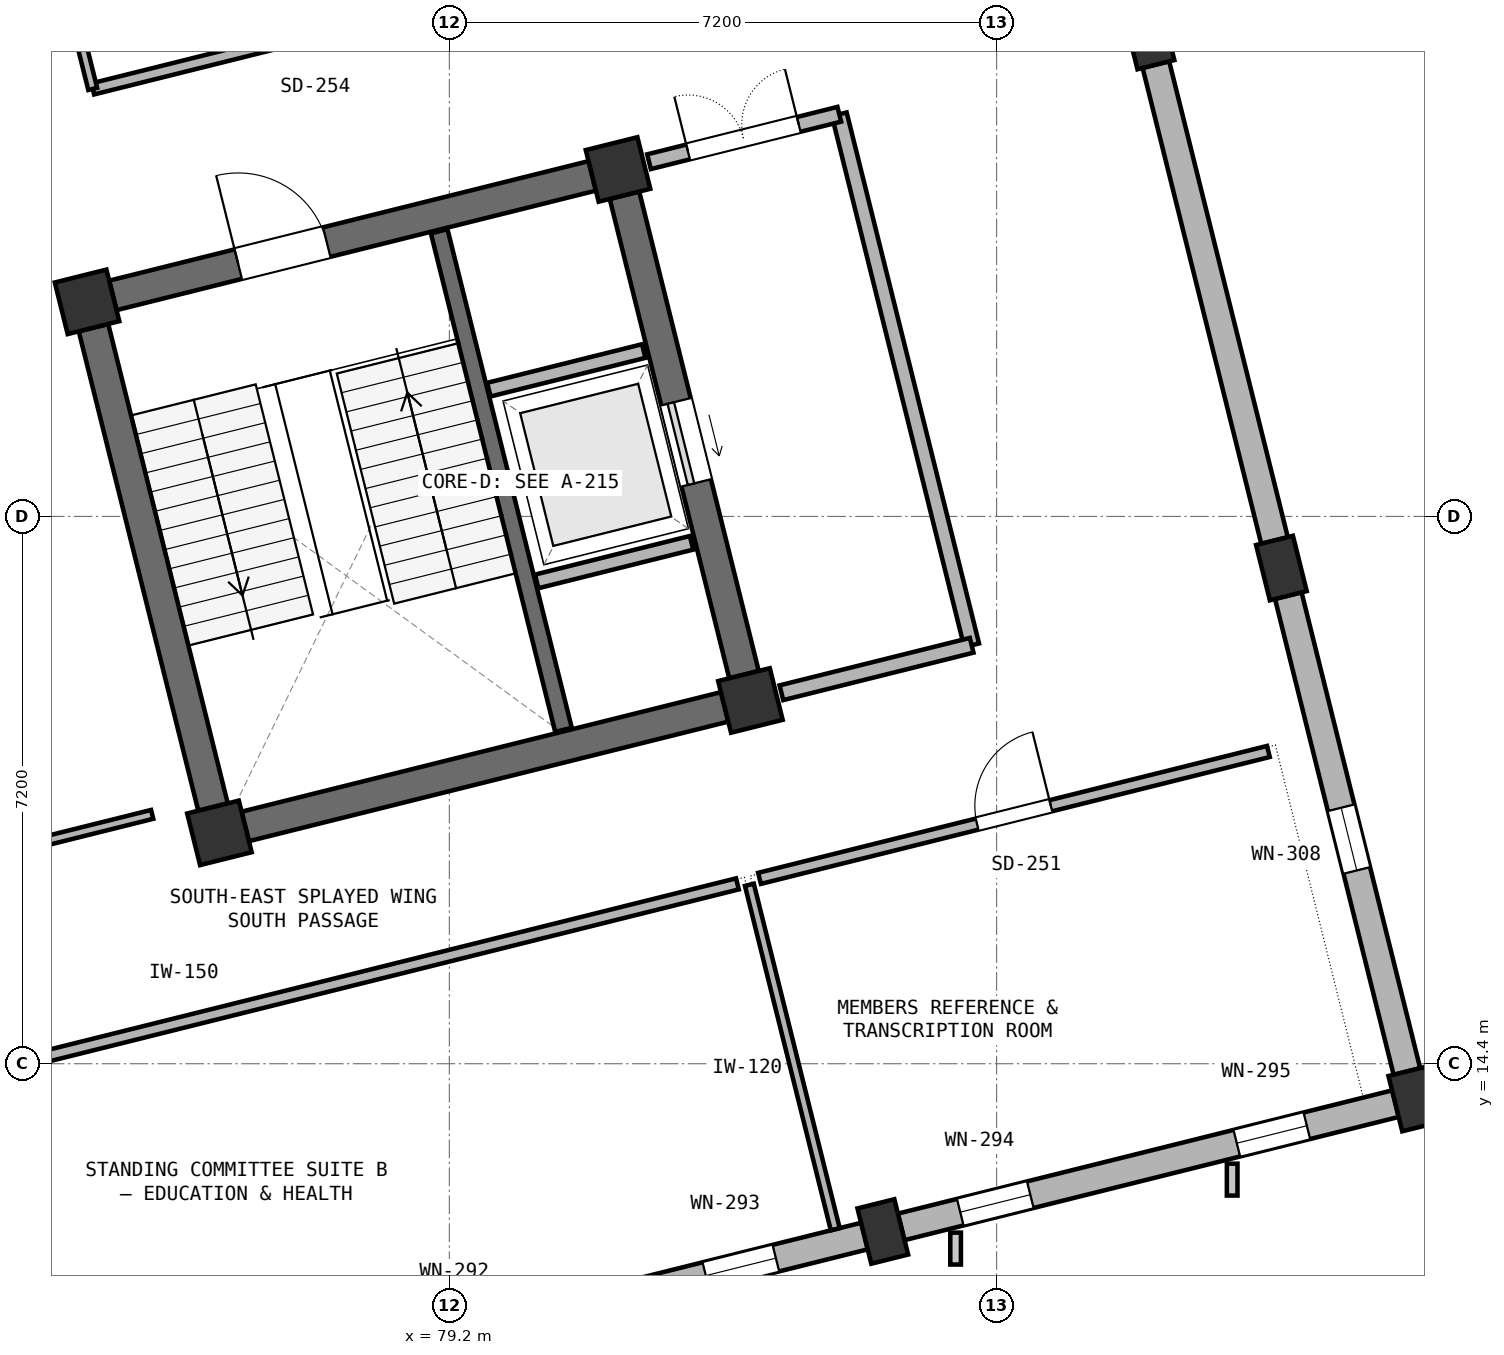
"""IFC4 building model, lengths in metres.
Left out: names, types, materials, properties, quantities, classifications, styles, units other than length and angle.
Written with IfcOpenShell. Run it as: python <this file> out.ifc"""

import sys

from ifc_helpers import new_model, si_unit, direction, frame, frame_2d, origin, origin_2d, place, context, subcontext, project, spatial, rectangle, extrude, element, fill, save


model = new_model("IFC4")
c1 = context("Model", 3, precision=1e-05, world=origin(), true_north=direction((0.0, 1.0)))
c2 = subcontext(c1, "Body", "Model", "MODEL_VIEW")
j1 = project(units=[si_unit("LENGTHUNIT", "METRE"), si_unit("PLANEANGLEUNIT", "RADIAN")], contexts=[c1])
p1 = place(None, origin())
s1 = spatial("IfcSite", under=j1, at=p1, CompositionType="ELEMENT")
p2 = place(p1, origin())
s2 = spatial("IfcBuilding", under=s1, at=p2, CompositionType="ELEMENT")
p3 = place(p2, frame((0.0, 0.0, 10.2)))
s3 = spatial("IfcBuildingStorey", under=s2, at=p3, CompositionType="ELEMENT", Elevation=10.2)
for number, where, z_axis, x_axis in (
    (1, (76.175, 17.437, 0.0), (0.0, 0.0, 1.0), (0.97, 0.242, 0.0)),
    (2, (74.433, 24.423, 0.0), (0.0, 0.0, 1.0), (0.97, 0.242, 0.0)),
):
    element("IfcColumn", number, at=place(p3, frame(where, z_axis=z_axis, x_axis=x_axis)), inside=s3, PredefinedType="COLUMN", context=c2, shape_type="SweptSolid", body=[
        extrude(rectangle(XDim=0.7, YDim=0.7, at=origin_2d()), origin(), (0.0, 0.0, 1.0), 4.2),
    ])
p4 = place(p3, frame((84.903, 12.193, 0.0), z_axis=(0.0, 0.0, 1.0), x_axis=(0.970295726276, 0.2419218956, 0.0)))
e3 = element("IfcColumn", 3, at=p4, inside=s3, PredefinedType="COLUMN", context=c2, shape_type="SweptSolid", body=[
    extrude(rectangle(XDim=0.5, YDim=0.75, at=origin_2d()), origin(), (0.0, 0.0, 1.0), 4.2),
])
for number, where, z_axis, x_axis in (
    (4, (83.161, 19.179, 0.0), (0.0, 0.0, 1.0), (0.97, 0.242, 0.0)),
    (5, (81.419, 26.165, 0.0), (0.0, 0.0, 1.0), (0.97, 0.242, 0.0)),
):
    element("IfcColumn", number, at=place(p3, frame(where, z_axis=z_axis, x_axis=x_axis)), inside=s3, PredefinedType="COLUMN", context=c2, shape_type="SweptSolid", body=[
        extrude(rectangle(XDim=0.7, YDim=0.7, at=origin_2d()), origin(), (0.0, 0.0, 1.0), 4.2),
    ])
for number, where, z_axis, x_axis in (
    (6, (91.889, 13.935, 0.0), (0.0, 0.0, 1.0), (0.97, 0.242, 0.0)),
    (7, (90.147, 20.921, 0.0), (0.0, 0.0, 1.0), (0.97, 0.242, 0.0)),
    (8, (88.405, 27.907, 0.0), (0.0, 0.0, 1.0), (0.97, 0.242, 0.0)),
):
    element("IfcColumn", number, at=place(p3, frame(where, z_axis=z_axis, x_axis=x_axis)), inside=s3, PredefinedType="COLUMN", context=c2, shape_type="SweptSolid", body=[
        extrude(rectangle(XDim=0.5, YDim=0.75, at=origin_2d()), origin(), (0.0, 0.0, 1.0), 4.2),
    ])
p5 = place(p3, frame((76.515, 17.522, 0.0), z_axis=(0.0, 0.0, 1.0), x_axis=(0.970294759049, 0.241925774902, 0.0)))
e9 = element("IfcWall", 9, at=p5, inside=s3, PredefinedType="SHEAR", context=c2, shape_type="SweptSolid", body=[
    extrude(rectangle(XDim=6.5, YDim=0.4, at=frame_2d((3.25, 0.0))), origin(), (0.0, 0.0, 1.0), 4.2),
])
p6 = place(p3, frame((83.076, 19.519, 0.0), z_axis=(0.0, 0.0, 1.0), x_axis=(-0.241925774902, 0.970294759049, 0.0)))
e10 = element("IfcWall", 10, at=p6, inside=s3, PredefinedType="SHEAR", context=c2, shape_type="SweptSolid", body=[
    extrude(rectangle(XDim=6.5, YDim=0.4, at=frame_2d((3.25, 0.0))), origin(), (0.0, 0.0, 1.0), 4.2),
])
p7 = place(p6, frame((2.6, 0.0, 0.0)))
e11 = element("IfcOpeningElement", 11, at=p7, cuts=e10, PredefinedType="OPENING", context=c2, shape_type="SweptSolid", body=[
    extrude(rectangle(XDim=1.1, YDim=2.2, at=frame_2d((0.55, 1.1))), frame((0.0, 0.21, 0.0), z_axis=(0.0, -1.0, 0.0), x_axis=(1.0, 0.0, 0.0)), (0.0, 0.0, 1.0), 0.42),
])
p8 = place(p3, frame((81.08, 26.081, 0.0), z_axis=(0.0, 0.0, 1.0), x_axis=(-0.970294759049, -0.241925774902, 0.0)))
e12 = element("IfcWall", 12, at=p8, inside=s3, PredefinedType="SHEAR", context=c2, shape_type="SweptSolid", body=[
    extrude(rectangle(XDim=6.5, YDim=0.4, at=frame_2d((3.25, 0.0))), origin(), (0.0, 0.0, 1.0), 4.2),
])
p9 = place(p8, frame((3.6, 0.0, 0.0)))
e13 = element("IfcOpeningElement", 13, at=p9, cuts=e12, PredefinedType="OPENING", context=c2, shape_type="SweptSolid", body=[
    extrude(rectangle(XDim=1.2, YDim=2.2, at=frame_2d((0.6, 1.1))), frame((0.0, 0.21, 0.0), z_axis=(0.0, -1.0, 0.0), x_axis=(1.0, 0.0, 0.0)), (0.0, 0.0, 1.0), 0.42),
])
p10 = place(p3, frame((74.518, 24.084, 0.0), z_axis=(0.0, 0.0, 1.0), x_axis=(0.241925774902, -0.970294759049, 0.0)))
e14 = element("IfcWall", 14, at=p10, inside=s3, PredefinedType="SHEAR", context=c2, shape_type="SweptSolid", body=[
    extrude(rectangle(XDim=6.5, YDim=0.4, at=frame_2d((3.25, 0.0))), origin(), (0.0, 0.0, 1.0), 4.2),
])
p11 = place(p3, frame((80.701, 18.792, 0.0), z_axis=(0.0, 0.0, 1.0), x_axis=(-0.241898249226, 0.970301621673, 0.0)))
e15 = element("IfcWall", 15, at=p11, inside=s3, PredefinedType="SHEAR", context=c2, shape_type="SweptSolid", body=[
    extrude(rectangle(XDim=6.76, YDim=0.225, at=frame_2d((3.38, 0.0))), origin(), (0.0, 0.0, 1.0), 4.2),
])
for number, where, z_axis, x_axis in (
    (16, (80.349, 20.745, 0.0), (0.0, 0.0, 1.0), (0.97, 0.242, 0.0)),
    (17, (79.72, 23.268, 0.0), (0.0, 0.0, 1.0), (0.97, 0.242, 0.0)),
):
    element("IfcWall", number, at=place(p3, frame(where, z_axis=z_axis, x_axis=x_axis)), inside=s3, PredefinedType="PARTITIONING", context=c2, shape_type="SweptSolid", body=[
        extrude(rectangle(XDim=2.1, YDim=0.185, at=frame_2d((1.05, 0.0))), origin(), (0.0, 0.0, 1.0), 4.2),
    ])
p12 = place(p3, frame((78.157, 10.511, 0.0), z_axis=(0.0, 0.0, 1.0), x_axis=(0.970296540998, 0.241918627903, 0.0)))
e18 = element("IfcWall", 18, at=p12, inside=s3, PredefinedType="SOLIDWALL", context=c2, shape_type="SweptSolid", body=[
    extrude(rectangle(XDim=6.704, YDim=0.36, at=frame_2d((3.352, 0.0))), origin(), (0.0, 0.0, 1.0), 3.04),
])
p13 = place(p12, frame((0.802, 0.0, 0.7)))
e19 = element("IfcOpeningElement", 19, at=p13, cuts=e18, PredefinedType="OPENING", context=c2, shape_type="SweptSolid", body=[
    extrude(rectangle(XDim=1.1, YDim=2.19, at=frame_2d((0.55, 1.095))), frame((0.0, 0.19, 0.0), z_axis=(0.0, -1.0, 0.0), x_axis=(1.0, 0.0, 0.0)), (0.0, 0.0, 1.0), 0.38),
])
p14 = place(p12, frame((4.552, 0.0, 0.7)))
e20 = element("IfcOpeningElement", 20, at=p14, cuts=e18, PredefinedType="OPENING", context=c2, shape_type="SweptSolid", body=[
    extrude(rectangle(XDim=0.95, YDim=2.19, at=frame_2d((0.475, 1.095))), frame((0.0, 0.19, 0.0), z_axis=(0.0, -1.0, 0.0), x_axis=(1.0, 0.0, 0.0)), (0.0, 0.0, 1.0), 0.38),
])
p15 = place(p3, frame((85.144, 12.253, 0.0), z_axis=(0.0, 0.0, 1.0), x_axis=(0.970296540998, 0.241918627903, 0.0)))
e21 = element("IfcWall", 21, at=p15, inside=s3, PredefinedType="SOLIDWALL", context=c2, shape_type="SweptSolid", body=[
    extrude(rectangle(XDim=6.704, YDim=0.36, at=frame_2d((3.352, 0.0))), origin(), (0.0, 0.0, 1.0), 3.04),
])
p16 = place(p15, frame((0.802, 0.0, 0.7)))
e22 = element("IfcOpeningElement", 22, at=p16, cuts=e21, PredefinedType="OPENING", context=c2, shape_type="SweptSolid", body=[
    extrude(rectangle(XDim=0.95, YDim=2.19, at=frame_2d((0.475, 1.095))), frame((0.0, 0.19, 0.0), z_axis=(0.0, -1.0, 0.0), x_axis=(1.0, 0.0, 0.0)), (0.0, 0.0, 1.0), 0.38),
])
p17 = place(p15, frame((4.552, 0.0, 0.7)))
e23 = element("IfcOpeningElement", 23, at=p17, cuts=e21, PredefinedType="OPENING", context=c2, shape_type="SweptSolid", body=[
    extrude(rectangle(XDim=0.95, YDim=2.19, at=frame_2d((0.475, 1.095))), frame((0.0, 0.19, 0.0), z_axis=(0.0, -1.0, 0.0), x_axis=(1.0, 0.0, 0.0)), (0.0, 0.0, 1.0), 0.38),
])
p18 = place(p3, frame((91.799, 14.297, 0.0), z_axis=(0.0, 0.0, 1.0), x_axis=(-0.241912519272, 0.970298064009, 0.0)))
e24 = element("IfcWall", 24, at=p18, inside=s3, PredefinedType="SOLIDWALL", context=c2, shape_type="SweptSolid", body=[
    extrude(rectangle(XDim=6.454, YDim=0.36, at=frame_2d((3.227, 0.0))), origin(), (0.0, 0.0, 1.0), 3.04),
])
p19 = place(p18, frame((2.727, 0.0, 0.7)))
e25 = element("IfcOpeningElement", 25, at=p19, cuts=e24, PredefinedType="OPENING", context=c2, shape_type="SweptSolid", body=[
    extrude(rectangle(XDim=0.85, YDim=2.19, at=frame_2d((0.425, 1.095))), frame((0.0, 0.19, 0.0), z_axis=(0.0, -1.0, 0.0), x_axis=(1.0, 0.0, 0.0)), (0.0, 0.0, 1.0), 0.38),
])
p20 = place(p3, frame((90.057, 21.283, 0.0), z_axis=(0.0, 0.0, 1.0), x_axis=(-0.241912519272, 0.970298064009, 0.0)))
e26 = element("IfcWall", 26, at=p20, inside=s3, PredefinedType="SOLIDWALL", context=c2, shape_type="SweptSolid", body=[
    extrude(rectangle(XDim=6.454, YDim=0.36, at=frame_2d((3.227, 0.0))), origin(), (0.0, 0.0, 1.0), 3.04),
])
p21 = place(p3, frame((86.072, 19.905, 0.0), z_axis=(0.0, 0.0, 1.0), x_axis=(-0.241937193493, 0.970291911955, 0.0)))
e27 = element("IfcWall", 27, at=p21, inside=s3, PredefinedType="PARTITIONING", context=c2, shape_type="SweptSolid", body=[
    extrude(rectangle(XDim=7.2, YDim=0.2, at=frame_2d((3.6, 0.0))), origin(), (0.0, 0.0, 1.0), 3.08),
])
p22 = place(p3, frame((83.569, 19.281, 0.0), z_axis=(0.0, 0.0, 1.0), x_axis=(0.970287048366, 0.241956698135, 0.0)))
e28 = element("IfcWall", 28, at=p22, inside=s3, PredefinedType="PARTITIONING", context=c2, shape_type="SweptSolid", body=[
    extrude(rectangle(XDim=2.58, YDim=0.2, at=frame_2d((1.29, 0.0))), origin(), (0.0, 0.0, 1.0), 3.08),
])
p23 = place(p3, frame((84.33, 26.891, 0.0), z_axis=(0.0, 0.0, 1.0), x_axis=(-0.970309259708, -0.2418676095, 0.0)))
e29 = element("IfcWall", 29, at=p23, inside=s3, PredefinedType="PARTITIONING", context=c2, shape_type="SweptSolid", body=[
    extrude(rectangle(XDim=2.58, YDim=0.2, at=frame_2d((1.29, 0.0))), origin(), (0.0, 0.0, 1.0), 3.08),
])
p24 = place(p23, frame((0.55, 0.0, 0.0)))
e30 = element("IfcOpeningElement", 30, at=p24, cuts=e29, PredefinedType="OPENING", context=c2, shape_type="SweptSolid", body=[
    extrude(rectangle(XDim=1.5, YDim=2.2, at=frame_2d((0.75, 1.1))), frame((0.0, 0.11, 0.0), z_axis=(0.0, -1.0, 0.0), x_axis=(1.0, 0.0, 0.0)), (0.0, 0.0, 1.0), 0.22),
])
p25 = place(p3, frame((68.726, 13.21, 0.0), z_axis=(0.0, 0.0, 1.0), x_axis=(0.970297636173, 0.241914235293, 0.0)))
e31 = element("IfcWall", 31, at=p25, inside=s3, PredefinedType="PARTITIONING", context=c2, shape_type="SweptSolid", body=[
    extrude(rectangle(XDim=14.7, YDim=0.15, at=frame_2d((7.35, 0.0))), origin(), (0.0, 0.0, 1.0), 3.08),
])
p26 = place(p25, frame((1.65, 0.0, 0.0)))
e32 = element("IfcOpeningElement", 32, at=p26, cuts=e31, PredefinedType="OPENING", context=c2, shape_type="SweptSolid", body=[
    extrude(rectangle(XDim=1.6, YDim=2.2, at=frame_2d((0.8, 1.1))), frame((0.0, 0.085, 0.0), z_axis=(0.0, -1.0, 0.0), x_axis=(1.0, 0.0, 0.0)), (0.0, 0.0, 1.0), 0.17),
])
p27 = place(p3, frame((83.281, 16.838, 0.0), z_axis=(0.0, 0.0, 1.0), x_axis=(0.970290093403, 0.241944486697, 0.0)))
e33 = element("IfcWall", 33, at=p27, inside=s3, PredefinedType="PARTITIONING", context=c2, shape_type="SweptSolid", body=[
    extrude(rectangle(XDim=6.9, YDim=0.15, at=frame_2d((3.45, 0.0))), origin(), (0.0, 0.0, 1.0), 3.08),
])
p28 = place(p27, frame((2.95, 0.0, 0.0)))
e34 = element("IfcOpeningElement", 34, at=p28, cuts=e33, PredefinedType="OPENING", context=c2, shape_type="SweptSolid", body=[
    extrude(rectangle(XDim=1.0, YDim=2.2, at=frame_2d((0.5, 1.1))), frame((0.0, 0.085, 0.0), z_axis=(0.0, -1.0, 0.0), x_axis=(1.0, 0.0, 0.0)), (0.0, 0.0, 1.0), 0.17),
])
p29 = place(p3, frame((84.277, 12.222, 0.0), z_axis=(0.0, 0.0, 1.0), x_axis=(-0.241895920765, 0.97030220216, 0.0)))
e35 = element("IfcWall", 35, at=p29, inside=s3, PredefinedType="PARTITIONING", context=c2, shape_type="SweptSolid", body=[
    extrude(rectangle(XDim=4.67, YDim=0.12, at=frame_2d((2.335, 0.0))), origin(), (0.0, 0.0, 1.0), 3.08),
])
p30 = place(p3, frame((57.242, 13.18, 0.0), z_axis=(0.0, 0.0, 1.0), x_axis=(0.970295185925, 0.24192406282, 0.0)))
e36 = element("IfcWall", 36, at=p30, inside=s3, PredefinedType="PARTITIONING", context=c2, shape_type="SweptSolid", body=[
    extrude(rectangle(XDim=18.6, YDim=0.12, at=frame_2d((9.3, 0.0))), origin(), (0.0, 0.0, 1.0), 3.08),
])
p31 = place(p3, frame((74.508, 27.225, 0.0), z_axis=(0.0, 0.0, 1.0), x_axis=(0.970298350757, 0.241911369139, 0.0)))
e37 = element("IfcWall", 37, at=p31, inside=s3, PredefinedType="PARTITIONING", context=c2, shape_type="SweptSolid", body=[
    extrude(rectangle(XDim=12.7, YDim=0.15, at=frame_2d((6.35, 0.0))), origin(), (0.0, 0.0, 1.0), 3.08),
])
p32 = place(p31, frame((2.35, 0.0, 0.0)))
e38 = element("IfcOpeningElement", 38, at=p32, cuts=e37, PredefinedType="OPENING", context=c2, shape_type="SweptSolid", body=[
    extrude(rectangle(XDim=1.0, YDim=2.15, at=frame_2d((0.5, 1.075))), frame((0.0, 0.085, 0.0), z_axis=(0.0, -1.0, 0.0), x_axis=(1.0, 0.0, 0.0)), (0.0, 0.0, 1.0), 0.17),
])
p33 = place(p3, frame((74.508, 27.225, 0.0), z_axis=(0.0, 0.0, 1.0), x_axis=(-0.241924747697, 0.970295015164, 0.0)))
e39 = element("IfcWall", 39, at=p33, inside=s3, PredefinedType="PARTITIONING", context=c2, shape_type="SweptSolid", body=[
    extrude(rectangle(XDim=3.95, YDim=0.12, at=frame_2d((1.975, 0.0))), origin(), (0.0, 0.0, 1.0), 3.08),
])
p34 = place(p7, origin())
e40 = element("IfcDoor", 40, at=p34, inside=s3, OperationType="SLIDING_TO_LEFT", PredefinedType="DOOR", context=c2, shape_type="SweptSolid", body=[
    extrude(rectangle(XDim=1.1, YDim=2.2, at=frame_2d((0.55, 1.1))), frame((0.0, 0.025, 0.0), z_axis=(0.0, -1.0, 0.0), x_axis=(1.0, 0.0, 0.0)), (0.0, 0.0, 1.0), 0.05),
])
fill(e11, e40)
p35 = place(p14, origin())
e41 = element("IfcWindow", 41, at=p35, inside=s3, PartitioningType="SINGLE_PANEL", PredefinedType="WINDOW", context=c2, shape_type="SweptSolid", body=[
    extrude(rectangle(XDim=0.95, YDim=2.19, at=frame_2d((0.475, 1.095))), frame((0.0, 0.03, 0.0), z_axis=(0.0, -1.0, 0.0), x_axis=(1.0, 0.0, 0.0)), (0.0, 0.0, 1.0), 0.06),
])
fill(e20, e41)
p36 = place(p16, origin())
e42 = element("IfcWindow", 42, at=p36, inside=s3, PartitioningType="SINGLE_PANEL", PredefinedType="WINDOW", context=c2, shape_type="SweptSolid", body=[
    extrude(rectangle(XDim=0.95, YDim=2.19, at=frame_2d((0.475, 1.095))), frame((0.0, 0.03, 0.0), z_axis=(0.0, -1.0, 0.0), x_axis=(1.0, 0.0, 0.0)), (0.0, 0.0, 1.0), 0.06),
])
fill(e22, e42)
p37 = place(p17, origin())
e43 = element("IfcWindow", 43, at=p37, inside=s3, PartitioningType="SINGLE_PANEL", PredefinedType="WINDOW", context=c2, shape_type="SweptSolid", body=[
    extrude(rectangle(XDim=0.95, YDim=2.19, at=frame_2d((0.475, 1.095))), frame((0.0, 0.03, 0.0), z_axis=(0.0, -1.0, 0.0), x_axis=(1.0, 0.0, 0.0)), (0.0, 0.0, 1.0), 0.06),
])
fill(e23, e43)
p38 = place(p19, origin())
e44 = element("IfcWindow", 44, at=p38, inside=s3, PartitioningType="SINGLE_PANEL", PredefinedType="WINDOW", context=c2, shape_type="SweptSolid", body=[
    extrude(rectangle(XDim=0.85, YDim=2.19, at=frame_2d((0.425, 1.095))), frame((0.0, 0.03, 0.0), z_axis=(0.0, -1.0, 0.0), x_axis=(1.0, 0.0, 0.0)), (0.0, 0.0, 1.0), 0.06),
])
fill(e25, e44)
p39 = place(p9, frame((1.2, 0.0, 0.0), z_axis=(0.0, 0.0, 1.0), x_axis=(-1.0, 0.0, 0.0)))
e45 = element("IfcDoor", 45, at=p39, inside=s3, OperationType="SINGLE_SWING_LEFT", PredefinedType="DOOR", context=c2, shape_type="SweptSolid", body=[
    extrude(rectangle(XDim=1.2, YDim=2.2, at=frame_2d((0.6, 1.1))), frame((0.0, 0.025, 0.0), z_axis=(0.0, -1.0, 0.0), x_axis=(1.0, 0.0, 0.0)), (0.0, 0.0, 1.0), 0.05),
])
fill(e13, e45)
p40 = place(p24, frame((1.5, 0.0, 0.0), z_axis=(0.0, 0.0, 1.0), x_axis=(-1.0, 0.0, 0.0)))
e46 = element("IfcDoor", 46, at=p40, inside=s3, OperationType="DOUBLE_DOOR_SINGLE_SWING", PredefinedType="DOOR", context=c2, shape_type="SweptSolid", body=[
    extrude(rectangle(XDim=1.5, YDim=2.2, at=frame_2d((0.75, 1.1))), frame((0.0, 0.025, 0.0), z_axis=(0.0, -1.0, 0.0), x_axis=(1.0, 0.0, 0.0)), (0.0, 0.0, 1.0), 0.05),
])
fill(e30, e46)
p41 = place(p28, origin())
e47 = element("IfcDoor", 47, at=p41, inside=s3, OperationType="SINGLE_SWING_RIGHT", PredefinedType="DOOR", context=c2, shape_type="SweptSolid", body=[
    extrude(rectangle(XDim=1.0, YDim=2.2, at=frame_2d((0.5, 1.1))), frame((0.0, 0.025, 0.0), z_axis=(0.0, -1.0, 0.0), x_axis=(1.0, 0.0, 0.0)), (0.0, 0.0, 1.0), 0.05),
])
fill(e34, e47)
save(model, sys.argv[1])
